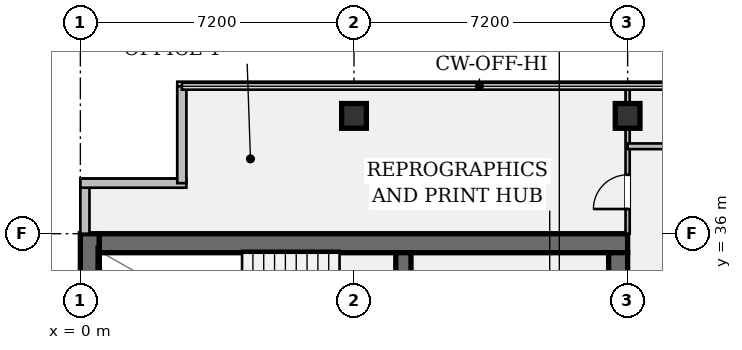
"""IFC4 building model, lengths in metres.
Left out: names, types, materials, properties, quantities, classifications, styles, units other than length and angle.
Written with IfcOpenShell. Run it as: python <this file> out.ifc"""

import sys

from ifc_helpers import new_model, si_unit, direction, frame, frame_2d, origin, origin_2d, place, context, subcontext, project, spatial, rectangle, hollow_rectangle, extrude, element, fill, save


model = new_model("IFC4")
c1 = context("Model", 3, precision=1e-05, world=origin(), true_north=direction((0.0, 1.0)))
c2 = subcontext(c1, "Body", "Model", "MODEL_VIEW")
j1 = project(units=[si_unit("LENGTHUNIT", "METRE"), si_unit("PLANEANGLEUNIT", "RADIAN")], contexts=[c1])
p1 = place(None, origin())
s1 = spatial("IfcSite", under=j1, at=p1, CompositionType="ELEMENT")
p2 = place(p1, origin())
s2 = spatial("IfcBuilding", under=s1, at=p2, CompositionType="ELEMENT")
p3 = place(p2, frame((0.0, 0.0, 255.15)))
s3 = spatial("IfcBuildingStorey", under=s2, at=p3, CompositionType="ELEMENT", Elevation=255.15)
p4 = place(p3, frame((0.25, 7.2, 0.0), z_axis=(0.0, 0.0, 1.0), x_axis=(0.0, 1.0, 0.0)))
e1 = element("IfcWall", 1, at=p4, inside=s3, PredefinedType="SHEAR", context=c2, shape_type="SweptSolid", body=[
    extrude(rectangle(XDim=28.8, YDim=0.5, at=frame_2d((14.4, 0.0))), origin(), (0.0, 0.0, 1.0), 3.24),
])
p5 = place(p3, frame((0.5, 35.75, 0.0), z_axis=(0.0, 0.0, 1.0), x_axis=(1.0, 0.0, 0.0)))
e2 = element("IfcWall", 2, at=p5, inside=s3, PredefinedType="SHEAR", context=c2, shape_type="SweptSolid", body=[
    extrude(rectangle(XDim=13.9, YDim=0.5, at=frame_2d((6.95, 0.0))), origin(), (0.0, 0.0, 1.0), 3.24),
])
p6 = place(p3, frame((14.15, 35.5, 0.0), z_axis=(0.0, 0.0, 1.0), x_axis=(0.0, -1.0, 0.0)))
e3 = element("IfcWall", 3, at=p6, inside=s3, PredefinedType="SHEAR", context=c2, shape_type="SweptSolid", body=[
    extrude(rectangle(XDim=27.8, YDim=0.5, at=frame_2d((13.9, 0.0))), origin(), (0.0, 0.0, 1.0), 3.24),
])
p7 = place(p6, frame((1.4, 0.0, 0.0)))
e4 = element("IfcOpeningElement", 4, at=p7, cuts=e3, PredefinedType="OPENING", context=c2, shape_type="SweptSolid", body=[
    extrude(rectangle(XDim=1.2, YDim=2.15, at=frame_2d((0.6, 1.075))), frame((0.0, 0.262, 0.0), z_axis=(0.0, -1.0, 0.0), x_axis=(1.0, 0.0, 0.0)), (0.0, 0.0, 1.0), 0.524),
])
p8 = place(p6, frame((25.35, 0.0, 0.0)))
e5 = element("IfcOpeningElement", 5, at=p8, cuts=e3, PredefinedType="OPENING", context=c2, shape_type="SweptSolid", body=[
    extrude(rectangle(XDim=1.2, YDim=2.15, at=frame_2d((0.6, 1.075))), frame((0.0, 0.262, 0.0), z_axis=(0.0, -1.0, 0.0), x_axis=(1.0, 0.0, 0.0)), (0.0, 0.0, 1.0), 0.524),
])
p9 = place(p6, frame((14.7, 0.0, 0.0)))
e6 = element("IfcOpeningElement", 6, at=p9, cuts=e3, PredefinedType="OPENING", context=c2, shape_type="SweptSolid", body=[
    extrude(rectangle(XDim=1.6, YDim=2.2, at=frame_2d((0.8, 1.1))), frame((0.0, 0.262, 0.0), z_axis=(0.0, -1.0, 0.0), x_axis=(1.0, 0.0, 0.0)), (0.0, 0.0, 1.0), 0.524),
])
p10 = place(p3, frame((8.5, 31.72, 0.0), z_axis=(0.0, 0.0, 1.0), x_axis=(0.0, 1.0, 0.0)))
e7 = element("IfcWall", 7, at=p10, inside=s3, PredefinedType="SHEAR", context=c2, shape_type="SweptSolid", body=[
    extrude(rectangle(XDim=3.78, YDim=0.4, at=frame_2d((1.89, 0.0))), origin(), (0.0, 0.0, 1.0), 3.24),
])
p11 = place(p10, frame((0.9, 0.0, 0.0)))
e8 = element("IfcOpeningElement", 8, at=p11, cuts=e7, PredefinedType="OPENING", context=c2, shape_type="SweptSolid", body=[
    extrude(rectangle(XDim=1.1, YDim=2.15, at=frame_2d((0.55, 1.075))), frame((0.0, 0.212, 0.0), z_axis=(0.0, -1.0, 0.0), x_axis=(1.0, 0.0, 0.0)), (0.0, 0.0, 1.0), 0.424),
])
for number, where, z_axis, x_axis in (
    (9, (7.2, 39.1, 0.0), (0.0, 0.0, 1.0), (1.0, 0.0, 0.0)),
    (10, (14.4, 39.1, 0.0), (0.0, 0.0, 1.0), (1.0, 0.0, 0.0)),
):
    element("IfcColumn", number, at=place(p3, frame(where, z_axis=z_axis, x_axis=x_axis)), inside=s3, PredefinedType="COLUMN", context=c2, shape_type="SweptSolid", body=[
        extrude(hollow_rectangle(XDim=0.65, YDim=0.65, WallThickness=0.04, at=origin_2d()), origin(), (0.0, 0.0, 1.0), 3.24),
    ])
p12 = place(p3, frame((0.12, 36.0, 0.0), z_axis=(0.0, 0.0, 1.0), x_axis=(0.0, 1.0, 0.0)))
e11 = element("IfcWall", 11, at=p12, inside=s3, PredefinedType="STANDARD", context=c2, shape_type="SweptSolid", body=[
    extrude(rectangle(XDim=1.33, YDim=0.24, at=frame_2d((0.665, 0.0))), origin(), (0.0, 0.0, 1.0), 3.24),
])
p13 = place(p3, frame((0.0, 37.33, 0.0), z_axis=(0.0, 0.0, 1.0), x_axis=(1.0, 0.0, 0.0)))
e12 = element("IfcWall", 12, at=p13, inside=s3, PredefinedType="STANDARD", context=c2, shape_type="SweptSolid", body=[
    extrude(rectangle(XDim=2.79, YDim=0.24, at=frame_2d((1.395, 0.0))), origin(), (0.0, 0.0, 1.0), 3.24),
])
p14 = place(p3, frame((2.67, 37.33, 0.0), z_axis=(0.0, 0.0, 1.0), x_axis=(0.0, 1.0, 0.0)))
e13 = element("IfcWall", 13, at=p14, inside=s3, PredefinedType="STANDARD", context=c2, shape_type="SweptSolid", body=[
    extrude(rectangle(XDim=2.55, YDim=0.24, at=frame_2d((1.275, 0.0))), origin(), (0.0, 0.0, 1.0), 3.24),
])
p15 = place(p3, frame((14.4, 36.0, 0.0), z_axis=(0.0, 0.0, 1.0), x_axis=(0.0, 1.0, 0.0)))
e14 = element("IfcWall", 14, at=p15, inside=s3, PredefinedType="PARTITIONING", context=c2, shape_type="SweptSolid", body=[
    extrude(rectangle(XDim=3.88, YDim=0.11, at=frame_2d((1.94, 0.0))), origin(), (0.0, 0.0, 1.0), 2.676),
])
p16 = place(p15, frame((0.65, 0.0, 0.0)))
e15 = element("IfcOpeningElement", 15, at=p16, cuts=e14, PredefinedType="OPENING", context=c2, shape_type="SweptSolid", body=[
    extrude(rectangle(XDim=0.9, YDim=2.15, at=frame_2d((0.45, 1.075))), frame((0.0, 0.067, 0.0), z_axis=(0.0, -1.0, 0.0), x_axis=(1.0, 0.0, 0.0)), (0.0, 0.0, 1.0), 0.134),
])
p17 = place(p3, frame((14.4, 38.3, 0.0), z_axis=(0.0, 0.0, 1.0), x_axis=(1.0, 0.0, 0.0)))
e16 = element("IfcWall", 16, at=p17, inside=s3, PredefinedType="PARTITIONING", context=c2, shape_type="SweptSolid", body=[
    extrude(rectangle(XDim=2.95, YDim=0.15, at=frame_2d((1.475, 0.0))), origin(), (0.0, 0.0, 1.0), 3.24),
])
p18 = place(p17, frame((1.54, 0.0, 0.0)))
e17 = element("IfcOpeningElement", 17, at=p18, cuts=e16, PredefinedType="OPENING", context=c2, shape_type="SweptSolid", body=[
    extrude(rectangle(XDim=0.88, YDim=2.15, at=frame_2d((0.44, 1.075))), frame((0.0, 0.087, 0.0), z_axis=(0.0, -1.0, 0.0), x_axis=(1.0, 0.0, 0.0)), (0.0, 0.0, 1.0), 0.174),
])
p19 = place(p16, origin())
e18 = element("IfcDoor", 18, at=p19, inside=s3, OperationType="SINGLE_SWING_LEFT", PredefinedType="DOOR", context=c2, shape_type="SweptSolid", body=[
    extrude(rectangle(XDim=0.9, YDim=2.15, at=frame_2d((0.45, 1.075))), frame((0.0, 0.025, 0.0), z_axis=(0.0, -1.0, 0.0), x_axis=(1.0, 0.0, 0.0)), (0.0, 0.0, 1.0), 0.05),
])
fill(e15, e18)
save(model, sys.argv[1])
